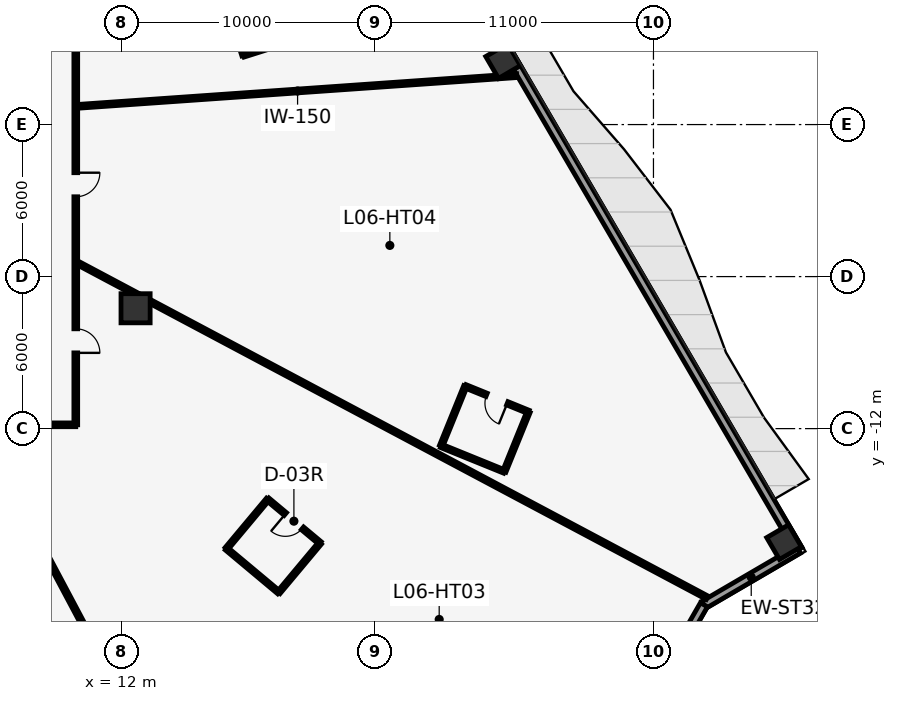
"""IFC4 building model, lengths in metres.
Left out: names, types, materials, properties, quantities, classifications, styles, units other than length and angle.
Written with IfcOpenShell. Run it as: python <this file> out.ifc"""

import sys

from ifc_helpers import new_model, si_unit, direction, frame, frame_2d, origin, origin_2d, place, context, subcontext, project, spatial, rectangle, hollow_rectangle, extrude, element, fill, save


model = new_model("IFC4")
c1 = context("Model", 3, precision=1e-05, world=origin(), true_north=direction((0.0, 1.0)))
c2 = subcontext(c1, "Body", "Model", "MODEL_VIEW")
j1 = project(units=[si_unit("LENGTHUNIT", "METRE"), si_unit("PLANEANGLEUNIT", "RADIAN")], contexts=[c1])
p1 = place(None, origin())
s1 = spatial("IfcSite", under=j1, at=p1, CompositionType="ELEMENT")
p2 = place(p1, origin())
s2 = spatial("IfcBuilding", under=s1, at=p2, CompositionType="ELEMENT")
p3 = place(p2, frame((0.0, 0.0, 34.4)))
s3 = spatial("IfcBuildingStorey", under=s2, at=p3, CompositionType="ELEMENT", Elevation=34.4)
p4 = place(p3, frame((12.56, -7.25, 0.0), z_axis=(0.0, 0.0, 1.0), x_axis=(1.0, 0.0, 0.0)))
e1 = element("IfcColumn", 1, at=p4, inside=s3, PredefinedType="COLUMN", context=c2, shape_type="SweptSolid", body=[
    extrude(rectangle(XDim=1.15, YDim=1.15, at=origin_2d()), origin(), (0.0, 0.0, 1.0), 4.0),
])
for number, where, z_axis, x_axis in (
    (2, (38.154, -16.481, 0.0), (0.0, 0.0, 1.0), (-0.504, 0.863, 0.0)),
    (3, (27.065, 2.506, 0.0), (0.0, 0.0, 1.0), (-0.504, 0.863, 0.0)),
):
    element("IfcColumn", number, at=place(p3, frame(where, z_axis=z_axis, x_axis=x_axis)), inside=s3, PredefinedType="COLUMN", context=c2, shape_type="SweptSolid", body=[
        extrude(hollow_rectangle(XDim=1.0, YDim=1.0, WallThickness=0.06, at=origin_2d()), origin(), (0.0, 0.0, 1.0), 4.0),
    ])
p5 = place(p3, frame((4.923, 41.122, 0.0), z_axis=(0.0, 0.0, 1.0), x_axis=(0.504213113214, -0.863579258935, 0.0)))
e4 = element("IfcWall", 4, at=p5, inside=s3, PredefinedType="STANDARD", context=c2, shape_type="SweptSolid", body=[
    extrude(rectangle(XDim=67.041, YDim=0.32, at=frame_2d((33.521, 0.0))), origin(), (0.0, 0.0, 1.0), 3.75),
])
p6 = place(p5, frame((33.021, 0.0, 0.0)))
e5 = element("IfcOpeningElement", 5, at=p6, cuts=e4, PredefinedType="OPENING", context=c2, shape_type="SweptSolid", body=[
    extrude(rectangle(XDim=1.0, YDim=2.15, at=frame_2d((0.5, 1.075))), frame((0.0, 0.17, 0.0), z_axis=(0.0, -1.0, 0.0), x_axis=(1.0, 0.0, 0.0)), (0.0, 0.0, 1.0), 0.34),
])
p7 = place(p3, frame((38.726, -16.773, 0.0), z_axis=(0.0, 0.0, 1.0), x_axis=(-0.863569936823, -0.504229079105, 0.0)))
e6 = element("IfcWall", 6, at=p7, inside=s3, PredefinedType="STANDARD", context=c2, shape_type="SweptSolid", body=[
    extrude(rectangle(XDim=4.324, YDim=0.32, at=frame_2d((2.162, 0.0))), origin(), (0.0, 0.0, 1.0), 3.75),
])
p8 = place(p3, frame((34.992, -18.954, 0.0), z_axis=(0.0, 0.0, 1.0), x_axis=(-0.497881323344, -0.867245171717, 0.0)))
e7 = element("IfcWall", 7, at=p8, inside=s3, PredefinedType="STANDARD", context=c2, shape_type="SweptSolid", body=[
    extrude(rectangle(XDim=2.217, YDim=0.32, at=frame_2d((1.108, 0.0))), origin(), (0.0, 0.0, 1.0), 3.75),
])
p9 = place(p3, frame((10.2, 12.15, 0.0), z_axis=(0.0, 0.0, 1.0), x_axis=(0.0, -1.0, 0.0)))
e8 = element("IfcWall", 8, at=p9, inside=s3, PredefinedType="PARTITIONING", context=c2, shape_type="SweptSolid", body=[
    extrude(rectangle(XDim=24.0, YDim=0.15, at=frame_2d((12.0, 0.0))), origin(), (0.0, 0.0, 1.0), 3.75),
])
p10 = place(p9, frame((20.211, 0.0, 0.0)))
e9 = element("IfcOpeningElement", 9, at=p10, cuts=e8, PredefinedType="OPENING", context=c2, shape_type="SweptSolid", body=[
    extrude(rectangle(XDim=0.95, YDim=2.15, at=frame_2d((0.475, 1.075))), frame((0.0, 0.085, 0.0), z_axis=(0.0, -1.0, 0.0), x_axis=(1.0, 0.0, 0.0)), (0.0, 0.0, 1.0), 0.17),
])
p11 = place(p9, frame((14.05, 0.0, 0.0)))
e10 = element("IfcOpeningElement", 10, at=p11, cuts=e8, PredefinedType="OPENING", context=c2, shape_type="SweptSolid", body=[
    extrude(rectangle(XDim=0.95, YDim=2.15, at=frame_2d((0.475, 1.075))), frame((0.0, 0.085, 0.0), z_axis=(0.0, -1.0, 0.0), x_axis=(1.0, 0.0, 0.0)), (0.0, 0.0, 1.0), 0.17),
])
p12 = place(p9, frame((7.292, 0.0, 0.0)))
e11 = element("IfcOpeningElement", 11, at=p12, cuts=e8, PredefinedType="OPENING", context=c2, shape_type="SweptSolid", body=[
    extrude(rectangle(XDim=0.95, YDim=2.15, at=frame_2d((0.475, 1.075))), frame((0.0, 0.085, 0.0), z_axis=(0.0, -1.0, 0.0), x_axis=(1.0, 0.0, 0.0)), (0.0, 0.0, 1.0), 0.17),
])
p13 = place(p3, frame((10.2, -11.85, 0.0), z_axis=(0.0, 0.0, 1.0), x_axis=(-1.0, 0.0, 0.0)))
e12 = element("IfcWall", 12, at=p13, inside=s3, PredefinedType="PARTITIONING", context=c2, shape_type="SweptSolid", body=[
    extrude(rectangle(XDim=20.4, YDim=0.15, at=frame_2d((10.2, 0.0))), origin(), (0.0, 0.0, 1.0), 3.75),
])
p14 = place(p13, frame((15.749, 0.0, 0.0)))
e13 = element("IfcOpeningElement", 13, at=p14, cuts=e12, PredefinedType="OPENING", context=c2, shape_type="SweptSolid", body=[
    extrude(rectangle(XDim=0.95, YDim=2.15, at=frame_2d((0.475, 1.075))), frame((0.0, 0.085, 0.0), z_axis=(0.0, -1.0, 0.0), x_axis=(1.0, 0.0, 0.0)), (0.0, 0.0, 1.0), 0.17),
])
p15 = place(p13, frame((7.604, 0.0, 0.0)))
e14 = element("IfcOpeningElement", 14, at=p15, cuts=e12, PredefinedType="OPENING", context=c2, shape_type="SweptSolid", body=[
    extrude(rectangle(XDim=0.95, YDim=2.15, at=frame_2d((0.475, 1.075))), frame((0.0, 0.085, 0.0), z_axis=(0.0, -1.0, 0.0), x_axis=(1.0, 0.0, 0.0)), (0.0, 0.0, 1.0), 0.17),
])
p16 = place(p3, frame((10.305, 0.721, 0.0), z_axis=(0.0, 0.0, 1.0), x_axis=(0.997564495515, 0.069750106007, 0.0)))
e15 = element("IfcWall", 15, at=p16, inside=s3, PredefinedType="PARTITIONING", context=c2, shape_type="SweptSolid", body=[
    extrude(rectangle(XDim=17.34, YDim=0.15, at=frame_2d((8.67, 0.0))), origin(), (0.0, 0.0, 1.0), 3.75),
])
p17 = place(p3, frame((6.357, -11.955, 0.0), z_axis=(0.0, 0.0, 1.0), x_axis=(0.469464713073, -0.882951234882, 0.0)))
e16 = element("IfcWall", 16, at=p17, inside=s3, PredefinedType="PARTITIONING", context=c2, shape_type="SweptSolid", body=[
    extrude(rectangle(XDim=14.802, YDim=0.15, at=frame_2d((7.401, 0.0))), origin(), (0.0, 0.0, 1.0), 3.75),
])
p18 = place(p3, frame((10.305, -5.479, 0.0), z_axis=(0.0, 0.0, 1.0), x_axis=(0.882948770752, -0.469469347484, 0.0)))
e17 = element("IfcWall", 17, at=p18, inside=s3, PredefinedType="PARTITIONING", context=c2, shape_type="SweptSolid", body=[
    extrude(rectangle(XDim=28.107, YDim=0.15, at=frame_2d((14.054, 0.0))), origin(), (0.0, 0.0, 1.0), 2.798),
])
p19 = place(p3, frame((16.148, -16.739, 0.0), z_axis=(0.0, 0.0, 1.0), x_axis=(0.76716376368, -0.641451291757, 0.0)))
e18 = element("IfcWall", 18, at=p19, inside=s3, PredefinedType="PARTITIONING", context=c2, shape_type="SweptSolid", body=[
    extrude(rectangle(XDim=2.69, YDim=0.14, at=frame_2d((1.345, 0.0))), origin(), (0.0, 0.0, 1.0), 3.75),
])
p20 = place(p3, frame((18.211, -18.465, 0.0), z_axis=(0.0, 0.0, 1.0), x_axis=(0.641497613341, 0.767125030277, 0.0)))
e19 = element("IfcWall", 19, at=p20, inside=s3, PredefinedType="PARTITIONING", context=c2, shape_type="SweptSolid", body=[
    extrude(rectangle(XDim=2.54, YDim=0.14, at=frame_2d((1.27, 0.0))), origin(), (0.0, 0.0, 1.0), 3.75),
])
p21 = place(p3, frame((19.841, -16.516, 0.0), z_axis=(0.0, 0.0, 1.0), x_axis=(-0.767156445247, 0.641460044364, 0.0)))
e20 = element("IfcWall", 20, at=p21, inside=s3, PredefinedType="PARTITIONING", context=c2, shape_type="SweptSolid", body=[
    extrude(rectangle(XDim=2.69, YDim=0.14, at=frame_2d((1.345, 0.0))), origin(), (0.0, 0.0, 1.0), 3.75),
])
p22 = place(p21, frame((0.905, 0.0, 0.0)))
e21 = element("IfcOpeningElement", 21, at=p22, cuts=e20, PredefinedType="OPENING", context=c2, shape_type="SweptSolid", body=[
    extrude(rectangle(XDim=0.88, YDim=2.1, at=frame_2d((0.44, 1.05))), frame((0.0, 0.08, 0.0), z_axis=(0.0, -1.0, 0.0), x_axis=(1.0, 0.0, 0.0)), (0.0, 0.0, 1.0), 0.16),
])
p23 = place(p3, frame((17.777, -14.791, 0.0), z_axis=(0.0, 0.0, 1.0), x_axis=(-0.641393743612, -0.767211877942, 0.0)))
e22 = element("IfcWall", 22, at=p23, inside=s3, PredefinedType="PARTITIONING", context=c2, shape_type="SweptSolid", body=[
    extrude(rectangle(XDim=2.54, YDim=0.14, at=frame_2d((1.27, 0.0))), origin(), (0.0, 0.0, 1.0), 3.75),
])
p24 = place(p3, frame((24.62, -12.682, 0.0), z_axis=(0.0, 0.0, 1.0), x_axis=(0.926542709205, -0.376189590524, 0.0)))
e23 = element("IfcWall", 23, at=p24, inside=s3, PredefinedType="PARTITIONING", context=c2, shape_type="SweptSolid", body=[
    extrude(rectangle(XDim=2.69, YDim=0.14, at=frame_2d((1.345, 0.0))), origin(), (0.0, 0.0, 1.0), 3.75),
])
p25 = place(p3, frame((27.113, -13.694, 0.0), z_axis=(0.0, 0.0, 1.0), x_axis=(0.376224921193, 0.926528363664, 0.0)))
e24 = element("IfcWall", 24, at=p25, inside=s3, PredefinedType="PARTITIONING", context=c2, shape_type="SweptSolid", body=[
    extrude(rectangle(XDim=2.54, YDim=0.14, at=frame_2d((1.27, 0.0))), origin(), (0.0, 0.0, 1.0), 3.75),
])
p26 = place(p3, frame((28.068, -11.341, 0.0), z_axis=(0.0, 0.0, 1.0), x_axis=(-0.926542709205, 0.376189590524, 0.0)))
e25 = element("IfcWall", 25, at=p26, inside=s3, PredefinedType="PARTITIONING", context=c2, shape_type="SweptSolid", body=[
    extrude(rectangle(XDim=2.69, YDim=0.14, at=frame_2d((1.345, 0.0))), origin(), (0.0, 0.0, 1.0), 3.75),
])
p27 = place(p26, frame((0.905, 0.0, 0.0)))
e26 = element("IfcOpeningElement", 26, at=p27, cuts=e25, PredefinedType="OPENING", context=c2, shape_type="SweptSolid", body=[
    extrude(rectangle(XDim=0.88, YDim=2.1, at=frame_2d((0.44, 1.05))), frame((0.0, 0.08, 0.0), z_axis=(0.0, -1.0, 0.0), x_axis=(1.0, 0.0, 0.0)), (0.0, 0.0, 1.0), 0.16),
])
p28 = place(p3, frame((25.576, -10.329, 0.0), z_axis=(0.0, 0.0, 1.0), x_axis=(-0.376224921193, -0.926528363664, 0.0)))
e27 = element("IfcWall", 27, at=p28, inside=s3, PredefinedType="PARTITIONING", context=c2, shape_type="SweptSolid", body=[
    extrude(rectangle(XDim=2.54, YDim=0.14, at=frame_2d((1.27, 0.0))), origin(), (0.0, 0.0, 1.0), 3.75),
])
p29 = place(p3, frame((16.822, 2.731, 0.0), z_axis=(0.0, 0.0, 1.0), x_axis=(0.953175772707, 0.302416841998, 0.0)))
e28 = element("IfcWall", 28, at=p29, inside=s3, PredefinedType="PARTITIONING", context=c2, shape_type="SweptSolid", body=[
    extrude(rectangle(XDim=2.69, YDim=0.14, at=frame_2d((1.345, 0.0))), origin(), (0.0, 0.0, 1.0), 3.75),
])
p30 = place(p3, frame((16.054, 5.152, 0.0), z_axis=(0.0, 0.0, 1.0), x_axis=(0.302469641391, -0.953159019281, 0.0)))
e29 = element("IfcWall", 29, at=p30, inside=s3, PredefinedType="PARTITIONING", context=c2, shape_type="SweptSolid", body=[
    extrude(rectangle(XDim=2.54, YDim=0.14, at=frame_2d((1.27, 0.0))), origin(), (0.0, 0.0, 1.0), 3.75),
])
p31 = place(p22, origin())
e30 = element("IfcDoor", 30, at=p31, inside=s3, OperationType="SINGLE_SWING_RIGHT", PredefinedType="DOOR", context=c2, shape_type="SweptSolid", body=[
    extrude(rectangle(XDim=0.88, YDim=2.1, at=frame_2d((0.44, 1.05))), frame((0.0, 0.025, 0.0), z_axis=(0.0, -1.0, 0.0), x_axis=(1.0, 0.0, 0.0)), (0.0, 0.0, 1.0), 0.05),
])
fill(e21, e30)
p32 = place(p27, origin())
e31 = element("IfcDoor", 31, at=p32, inside=s3, OperationType="SINGLE_SWING_LEFT", PredefinedType="DOOR", context=c2, shape_type="SweptSolid", body=[
    extrude(rectangle(XDim=0.88, YDim=2.1, at=frame_2d((0.44, 1.05))), frame((0.0, 0.025, 0.0), z_axis=(0.0, -1.0, 0.0), x_axis=(1.0, 0.0, 0.0)), (0.0, 0.0, 1.0), 0.05),
])
fill(e26, e31)
p33 = place(p10, origin())
e32 = element("IfcDoor", 32, at=p33, inside=s3, OperationType="SINGLE_SWING_RIGHT", PredefinedType="DOOR", context=c2, shape_type="SweptSolid", body=[
    extrude(rectangle(XDim=0.95, YDim=2.15, at=frame_2d((0.475, 1.075))), frame((0.0, 0.025, 0.0), z_axis=(0.0, -1.0, 0.0), x_axis=(1.0, 0.0, 0.0)), (0.0, 0.0, 1.0), 0.05),
])
fill(e9, e32)
p34 = place(p11, origin())
e33 = element("IfcDoor", 33, at=p34, inside=s3, OperationType="SINGLE_SWING_LEFT", PredefinedType="DOOR", context=c2, shape_type="SweptSolid", body=[
    extrude(rectangle(XDim=0.95, YDim=2.15, at=frame_2d((0.475, 1.075))), frame((0.0, 0.025, 0.0), z_axis=(0.0, -1.0, 0.0), x_axis=(1.0, 0.0, 0.0)), (0.0, 0.0, 1.0), 0.05),
])
fill(e10, e33)
save(model, sys.argv[1])
